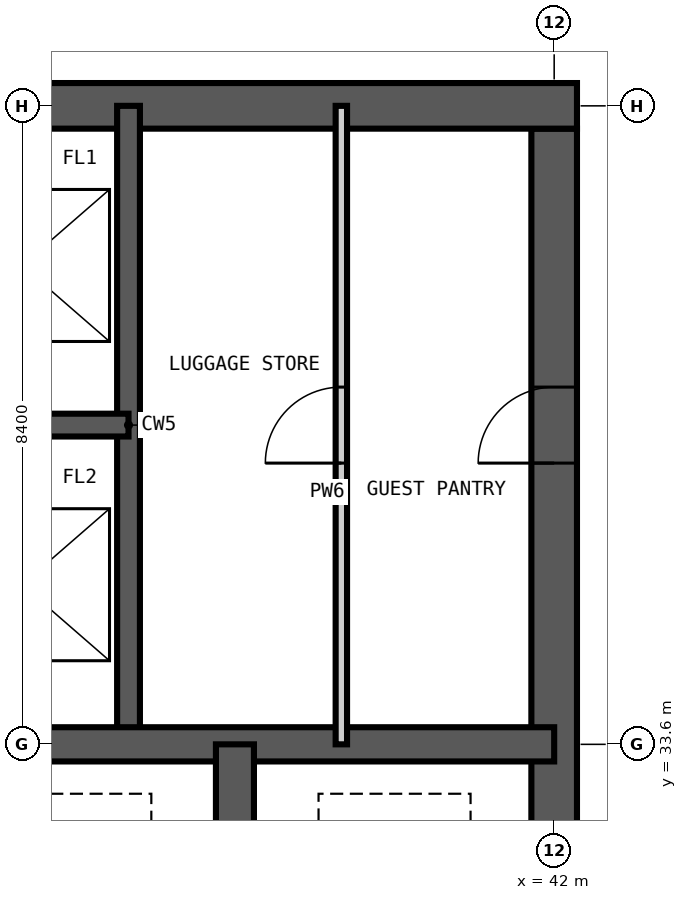
"""IFC4 building model, lengths in metres.
Left out: names, types, materials, properties, quantities, classifications, styles, units other than length and angle.
Written with IfcOpenShell. Run it as: python <this file> out.ifc"""

import sys

from ifc_helpers import new_model, si_unit, direction, frame, frame_2d, origin, place, context, subcontext, project, spatial, rectangle, extrude, element, fill, save


model = new_model("IFC4")
c1 = context("Model", 3, precision=1e-05, world=origin(), true_north=direction((0.0, 1.0)))
c2 = subcontext(c1, "Body", "Model", "MODEL_VIEW")
j1 = project(units=[si_unit("LENGTHUNIT", "METRE"), si_unit("PLANEANGLEUNIT", "RADIAN")], contexts=[c1])
p1 = place(None, origin())
s1 = spatial("IfcSite", under=j1, at=p1, CompositionType="ELEMENT")
p2 = place(p1, origin())
s2 = spatial("IfcBuilding", under=s1, at=p2, CompositionType="ELEMENT")
p3 = place(p2, frame((0.0, 0.0, 180.6)))
s3 = spatial("IfcBuildingStorey", under=s2, at=p3, CompositionType="ELEMENT", Elevation=180.6)
p4 = place(p3, frame((42.0, 17.1, -0.35), z_axis=(0.0, 0.0, 1.0), x_axis=(0.0, 1.0, 0.0)))
e1 = element("IfcWall", 1, at=p4, inside=s3, PredefinedType="SHEAR", context=c2, shape_type="SweptSolid", body=[
    extrude(rectangle(XDim=24.6, YDim=0.6, at=frame_2d((12.3, 0.0))), origin(), (0.0, 0.0, 1.0), 3.6),
])
p5 = place(p4, frame((0.5, 0.0, 0.35)))
e2 = element("IfcOpeningElement", 2, at=p5, cuts=e1, PredefinedType="OPENING", context=c2, shape_type="SweptSolid", body=[
    extrude(rectangle(XDim=1.2, YDim=2.2, at=frame_2d((0.6, 1.1))), frame((0.0, 0.31, 0.0), z_axis=(0.0, -1.0, 0.0), x_axis=(1.0, 0.0, 0.0)), (0.0, 0.0, 1.0), 0.62),
])
p6 = place(p4, frame((11.8, 0.0, 0.35)))
e3 = element("IfcOpeningElement", 3, at=p6, cuts=e1, PredefinedType="OPENING", context=c2, shape_type="SweptSolid", body=[
    extrude(rectangle(XDim=1.0, YDim=2.1, at=frame_2d((0.5, 1.05))), frame((0.0, 0.31, 0.0), z_axis=(0.0, -1.0, 0.0), x_axis=(1.0, 0.0, 0.0)), (0.0, 0.0, 1.0), 0.62),
])
p7 = place(p4, frame((20.2, 0.0, 0.35)))
e4 = element("IfcOpeningElement", 4, at=p7, cuts=e1, PredefinedType="OPENING", context=c2, shape_type="SweptSolid", body=[
    extrude(rectangle(XDim=1.0, YDim=2.1, at=frame_2d((0.5, 1.05))), frame((0.0, 0.31, 0.0), z_axis=(0.0, -1.0, 0.0), x_axis=(1.0, 0.0, 0.0)), (0.0, 0.0, 1.0), 0.62),
])
p8 = place(p3, frame((42.3, 42.0, -0.35), z_axis=(0.0, 0.0, 1.0), x_axis=(-1.0, 0.0, 0.0)))
e5 = element("IfcWall", 5, at=p8, inside=s3, PredefinedType="SHEAR", context=c2, shape_type="SweptSolid", body=[
    extrude(rectangle(XDim=25.8, YDim=0.6, at=frame_2d((12.9, 0.0))), origin(), (0.0, 0.0, 1.0), 3.6),
])
p9 = place(p8, frame((20.8, 0.0, 0.35)))
e6 = element("IfcOpeningElement", 6, at=p9, cuts=e5, PredefinedType="OPENING", context=c2, shape_type="SweptSolid", body=[
    extrude(rectangle(XDim=1.0, YDim=2.1, at=frame_2d((0.5, 1.05))), frame((0.0, 0.31, 0.0), z_axis=(0.0, -1.0, 0.0), x_axis=(1.0, 0.0, 0.0)), (0.0, 0.0, 1.0), 0.62),
])
p10 = place(p8, frame((10.2, 0.0, 0.35)))
e7 = element("IfcOpeningElement", 7, at=p10, cuts=e5, PredefinedType="OPENING", context=c2, shape_type="SweptSolid", body=[
    extrude(rectangle(XDim=1.2, YDim=2.2, at=frame_2d((0.6, 1.1))), frame((0.0, 0.31, 0.0), z_axis=(0.0, -1.0, 0.0), x_axis=(1.0, 0.0, 0.0)), (0.0, 0.0, 1.0), 0.62),
])
p11 = place(p3, frame((36.4, 33.6, -0.35), z_axis=(0.0, 0.0, 1.0), x_axis=(0.0, 1.0, 0.0)))
e8 = element("IfcWall", 8, at=p11, inside=s3, PredefinedType="SHEAR", context=c2, shape_type="SweptSolid", body=[
    extrude(rectangle(XDim=8.4, YDim=0.3, at=frame_2d((4.2, 0.0))), origin(), (0.0, 0.0, 1.0), 3.6),
])
p12 = place(p3, frame((33.6, 37.8, -0.35), z_axis=(0.0, 0.0, 1.0), x_axis=(1.0, 0.0, 0.0)))
e9 = element("IfcWall", 9, at=p12, inside=s3, PredefinedType="SHEAR", context=c2, shape_type="SweptSolid", body=[
    extrude(rectangle(XDim=2.8, YDim=0.3, at=frame_2d((1.4, 0.0))), origin(), (0.0, 0.0, 1.0), 3.6),
])
p13 = place(p3, frame((16.8, 33.6, -0.35), z_axis=(0.0, 0.0, 1.0), x_axis=(1.0, 0.0, 0.0)))
e10 = element("IfcWall", 10, at=p13, inside=s3, PredefinedType="SHEAR", context=c2, shape_type="SweptSolid", body=[
    extrude(rectangle(XDim=25.2, YDim=0.45, at=frame_2d((12.6, 0.0))), origin(), (0.0, 0.0, 1.0), 3.6),
])
p14 = place(p3, frame((37.8, 30.8, -0.35), z_axis=(0.0, 0.0, 1.0), x_axis=(0.0, 1.0, 0.0)))
e11 = element("IfcWall", 11, at=p14, inside=s3, PredefinedType="SHEAR", context=c2, shape_type="SweptSolid", body=[
    extrude(rectangle(XDim=2.8, YDim=0.5, at=frame_2d((1.4, 0.0))), origin(), (0.0, 0.0, 1.0), 3.6),
])
p15 = place(p3, frame((39.2, 33.6, 0.0), z_axis=(0.0, 0.0, 1.0), x_axis=(0.0, 1.0, 0.0)))
e12 = element("IfcWall", 12, at=p15, inside=s3, PredefinedType="PARTITIONING", context=c2, shape_type="SweptSolid", body=[
    extrude(rectangle(XDim=8.4, YDim=0.15, at=frame_2d((4.2, 0.0))), origin(), (0.0, 0.0, 1.0), 3.25),
])
p16 = place(p15, frame((3.7, 0.0, 0.0)))
e13 = element("IfcOpeningElement", 13, at=p16, cuts=e12, PredefinedType="OPENING", context=c2, shape_type="SweptSolid", body=[
    extrude(rectangle(XDim=1.0, YDim=2.1, at=frame_2d((0.5, 1.05))), frame((0.0, 0.085, 0.0), z_axis=(0.0, -1.0, 0.0), x_axis=(1.0, 0.0, 0.0)), (0.0, 0.0, 1.0), 0.17),
])
p17 = place(p7, origin())
e14 = element("IfcDoor", 14, at=p17, inside=s3, OperationType="SINGLE_SWING_LEFT", PredefinedType="DOOR", context=c2, shape_type="SweptSolid", body=[
    extrude(rectangle(XDim=1.0, YDim=2.1, at=frame_2d((0.5, 1.05))), frame((0.0, 0.025, 0.0), z_axis=(0.0, -1.0, 0.0), x_axis=(1.0, 0.0, 0.0)), (0.0, 0.0, 1.0), 0.05),
])
fill(e4, e14)
p18 = place(p16, origin())
e15 = element("IfcDoor", 15, at=p18, inside=s3, OperationType="SINGLE_SWING_LEFT", PredefinedType="DOOR", context=c2, shape_type="SweptSolid", body=[
    extrude(rectangle(XDim=1.0, YDim=2.1, at=frame_2d((0.5, 1.05))), frame((0.0, 0.025, 0.0), z_axis=(0.0, -1.0, 0.0), x_axis=(1.0, 0.0, 0.0)), (0.0, 0.0, 1.0), 0.05),
])
fill(e13, e15)
save(model, sys.argv[1])
